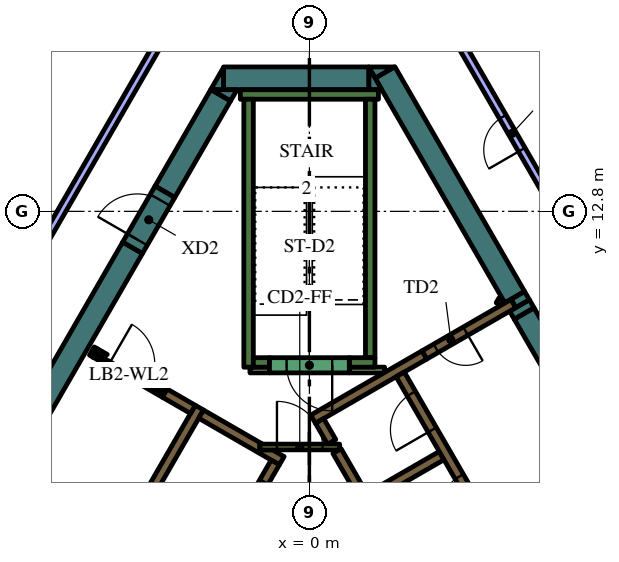
"""IFC4 building model, lengths in metres.
Left out: names, types, materials, properties, quantities, classifications, styles, units other than length and angle.
Written with IfcOpenShell. Run it as: python <this file> out.ifc"""

import sys

from ifc_helpers import new_model, si_unit, direction, frame, frame_2d, origin, place, context, subcontext, project, spatial, polyline, rectangle, outline, extrude, element, fill, save


model = new_model("IFC4")
c1 = context("Model", 3, precision=1e-05, world=origin(), true_north=direction((0.0, 1.0)))
c2 = subcontext(c1, "Body", "Model", "MODEL_VIEW")
j1 = project(units=[si_unit("LENGTHUNIT", "METRE"), si_unit("PLANEANGLEUNIT", "RADIAN")], contexts=[c1])
p1 = place(None, origin())
s1 = spatial("IfcSite", under=j1, at=p1, CompositionType="ELEMENT")
p2 = place(p1, origin())
s2 = spatial("IfcBuilding", under=s1, at=p2, CompositionType="ELEMENT")
p3 = place(p2, frame((0.0, 0.0, 300.6)))
s3 = spatial("IfcBuildingStorey", under=s2, at=p3, CompositionType="ELEMENT", Elevation=300.6)
p4 = place(p3, frame((5.529, 10.324, 0.0), z_axis=(0.0, 0.0, 1.0), x_axis=(0.499122205112, -0.866531606097, 0.0)))
e1 = element("IfcWall", 1, at=p4, inside=s3, PredefinedType="SOLIDWALL", context=c2, shape_type="SweptSolid", body=[
    extrude(rectangle(XDim=0.247, YDim=0.6, at=frame_2d((0.123, 0.0))), origin(), (0.0, 0.0, 1.0), 4.2),
])
p5 = place(p3, frame((1.989, 16.456, 0.0), z_axis=(0.0, 0.0, 1.0), x_axis=(0.499973159588, -0.866040899549, 0.0)))
e2 = element("IfcWall", 2, at=p5, inside=s3, PredefinedType="SOLIDWALL", context=c2, shape_type="SweptSolid", body=[
    extrude(rectangle(XDim=6.828, YDim=0.6, at=frame_2d((3.414, 0.0))), origin(), (0.0, 0.0, 1.0), 4.2),
])
p6 = place(p3, origin())
e3 = element("IfcWall", 3, at=p6, inside=s3, PredefinedType="SOLIDWALL", context=c2, shape_type="SweptSolid", body=[
    extrude(outline(polyline([(5.664, 10.691), (5.788, 10.476), (5.432, 10.271), (5.308, 10.486), (5.664, 10.691)])), origin(), (0.0, 0.0, 1.0), 4.2),
])
e4 = element("IfcWall", 4, at=p6, inside=s3, PredefinedType="SOLIDWALL", context=c2, shape_type="SweptSolid", body=[
    extrude(outline(polyline([(1.559, 16.6), (2.235, 16.6), (1.728, 16.307), (1.559, 16.6)])), origin(), (0.0, 0.0, 1.0), 4.2),
])
p7 = place(p3, frame((8.192, 5.711, 0.0), z_axis=(0.0, 0.0, 1.0), x_axis=(-0.500006836656, 0.866021456604, 0.0)))
e5 = element("IfcWall", 5, at=p7, inside=s3, PredefinedType="SOLIDWALL", context=c2, shape_type="SweptSolid", body=[
    extrude(rectangle(XDim=5.078, YDim=0.6, at=frame_2d((2.539, 0.0))), origin(), (0.0, 0.0, 1.0), 4.2),
])
p8 = place(p3, frame((-2.258, 16.3, 0.0), z_axis=(0.0, 0.0, 1.0), x_axis=(1.0, 0.0, 0.0)))
e6 = element("IfcWall", 6, at=p8, inside=s3, PredefinedType="SOLIDWALL", context=c2, shape_type="SweptSolid", body=[
    extrude(rectangle(XDim=3.823, YDim=0.6, at=frame_2d((1.912, 0.0))), origin(), (0.0, 0.0, 1.0), 4.2),
])
e7 = element("IfcWall", 7, at=p6, inside=s3, PredefinedType="SOLIDWALL", context=c2, shape_type="SweptSolid", body=[
    extrude(outline(polyline([(1.905, 16.0), (1.567, 16.0), (1.567, 16.585), (1.905, 16.0)])), origin(), (0.0, 0.0, 1.0), 4.2),
])
e8 = element("IfcWall", 8, at=p6, inside=s3, PredefinedType="SOLIDWALL", context=c2, shape_type="SweptSolid", body=[
    extrude(outline(polyline([(-2.598, 16.0), (-2.26, 16.585), (-2.26, 16.0), (-2.598, 16.0)])), origin(), (0.0, 0.0, 1.0), 4.2),
])
p9 = place(p3, frame((-2.335, 15.855, 0.0), z_axis=(0.0, 0.0, 1.0), x_axis=(-0.499960127962, -0.866048422692, 0.0)))
e9 = element("IfcWall", 9, at=p9, inside=s3, PredefinedType="SOLIDWALL", context=c2, shape_type="SweptSolid", body=[
    extrude(rectangle(XDim=2.934, YDim=0.6, at=frame_2d((1.467, 0.0))), origin(), (0.0, 0.0, 1.0), 4.2),
])
e10 = element("IfcWall", 10, at=p6, inside=s3, PredefinedType="SOLIDWALL", context=c2, shape_type="SweptSolid", body=[
    extrude(outline(polyline([(-1.905, 16.0), (-2.074, 15.707), (-2.581, 16.0), (-1.905, 16.0)])), origin(), (0.0, 0.0, 1.0), 4.2),
])
p10 = place(p3, frame((-12.582, -1.892, 0.0), z_axis=(0.0, 0.0, 1.0), x_axis=(0.500003640647, 0.866023301845, 0.0)))
e11 = element("IfcWall", 11, at=p10, inside=s3, PredefinedType="SOLIDWALL", context=c2, shape_type="SweptSolid", body=[
    extrude(rectangle(XDim=15.858, YDim=0.6, at=frame_2d((7.929, 0.0))), origin(), (0.0, 0.0, 1.0), 4.2),
])
p11 = place(p3, frame((-1.817, 15.875, 0.0), z_axis=(0.0, 0.0, 1.0), x_axis=(1.0, 0.0, 0.0)))
e12 = element("IfcWall", 12, at=p11, inside=s3, PredefinedType="SOLIDWALL", context=c2, shape_type="SweptSolid", body=[
    extrude(rectangle(XDim=3.634, YDim=0.25, at=frame_2d((1.817, 0.0))), origin(), (0.0, 0.0, 1.0), 4.2),
])
p12 = place(p3, frame((1.6, 8.95, 0.0), z_axis=(0.0, 0.0, 1.0), x_axis=(0.0, 1.0, 0.0)))
e13 = element("IfcWall", 13, at=p12, inside=s3, PredefinedType="SOLIDWALL", context=c2, shape_type="SweptSolid", body=[
    extrude(rectangle(XDim=6.8, YDim=0.25, at=frame_2d((3.4, 0.0))), origin(), (0.0, 0.0, 1.0), 4.2),
])
p13 = place(p3, frame((1.05, 8.825, 0.0), z_axis=(0.0, 0.0, 1.0), x_axis=(1.0, 0.0, 0.0)))
e14 = element("IfcWall", 14, at=p13, inside=s3, PredefinedType="SOLIDWALL", context=c2, shape_type="SweptSolid", body=[
    extrude(rectangle(XDim=0.675, YDim=0.25, at=frame_2d((0.337, 0.0))), origin(), (0.0, 0.0, 1.0), 4.2),
])
p14 = place(p3, frame((-1.6, 8.7, 0.0), z_axis=(0.0, 0.0, 1.0), x_axis=(0.0, 1.0, 0.0)))
e15 = element("IfcWall", 15, at=p14, inside=s3, PredefinedType="SOLIDWALL", context=c2, shape_type="SweptSolid", body=[
    extrude(rectangle(XDim=7.05, YDim=0.25, at=frame_2d((3.525, 0.0))), origin(), (0.0, 0.0, 1.0), 4.2),
])
p15 = place(p3, frame((-1.475, 8.825, 0.0), z_axis=(0.0, 0.0, 1.0), x_axis=(1.0, 0.0, 0.0)))
e16 = element("IfcWall", 16, at=p15, inside=s3, PredefinedType="SOLIDWALL", context=c2, shape_type="SweptSolid", body=[
    extrude(rectangle(XDim=0.425, YDim=0.25, at=frame_2d((0.212, 0.0))), origin(), (0.0, 0.0, 1.0), 4.2),
])
p16 = place(p3, frame((3.028, 9.023, 0.0), z_axis=(0.0, 0.0, 1.0), x_axis=(-0.866036587186, -0.49998062928, 0.0)))
e17 = element("IfcWall", 17, at=p16, inside=s3, PredefinedType="SOLIDWALL", context=c2, shape_type="SweptSolid", body=[
    extrude(rectangle(XDim=3.384, YDim=0.25, at=frame_2d((1.692, 0.0))), origin(), (0.0, 0.0, 1.0), 4.2),
])
p17 = place(p3, frame((0.268, 7.285, 0.0), z_axis=(0.0, 0.0, 1.0), x_axis=(0.500098681536, -0.865968422476, 0.0)))
e18 = element("IfcWall", 18, at=p17, inside=s3, PredefinedType="SOLIDWALL", context=c2, shape_type="SweptSolid", body=[
    extrude(rectangle(XDim=0.636, YDim=0.25, at=frame_2d((0.318, 0.0))), origin(), (0.0, 0.0, 1.0), 4.2),
])
p18 = place(p3, frame((5.97, -2.591, 0.0), z_axis=(0.0, 0.0, 1.0), x_axis=(-0.499994469932, 0.866028596547, 0.0)))
e19 = element("IfcWall", 19, at=p18, inside=s3, PredefinedType="SOLIDWALL", context=c2, shape_type="SweptSolid", body=[
    extrude(rectangle(XDim=10.488, YDim=0.25, at=frame_2d((5.244, 0.0))), origin(), (0.0, 0.0, 1.0), 4.2),
])
p19 = place(p3, frame((1.574, 5.274, 0.0), z_axis=(0.0, 0.0, 1.0), x_axis=(0.866028486751, 0.499994660107, 0.0)))
e20 = element("IfcWall", 20, at=p19, inside=s3, PredefinedType="SOLIDWALL", context=c2, shape_type="SweptSolid", body=[
    extrude(rectangle(XDim=2.2, YDim=0.25, at=frame_2d((1.1, 0.0))), origin(), (0.0, 0.0, 1.0), 4.2),
])
p20 = place(p3, frame((-8.06, -1.311, 0.0), z_axis=(0.0, 0.0, 1.0), x_axis=(0.50000273126, 0.866023826885, 0.0)))
e21 = element("IfcWall", 21, at=p20, inside=s3, PredefinedType="SOLIDWALL", context=c2, shape_type="SweptSolid", body=[
    extrude(rectangle(XDim=10.33, YDim=0.25, at=frame_2d((5.165, 0.0))), origin(), (0.0, 0.0, 1.0), 4.2),
])
e22 = element("IfcWall", 22, at=p6, inside=s3, PredefinedType="SOLIDWALL", context=c2, shape_type="SweptSolid", body=[
    extrude(outline(polyline([(-2.912, 7.356), (-2.787, 7.573), (-1.232, 6.675), (-1.303, 6.675), (-1.304, 6.675), (-1.304, 6.675), (-1.304, 6.525), (-1.304, 6.525), (-1.303, 6.525), (-0.971, 6.525), (-0.665, 6.348), (-0.79, 6.132), (-1.007, 6.257), (-1.007, 6.257), (-2.912, 7.356)])), origin(), (0.0, 0.0, 1.0), 4.2),
])
p21 = place(p3, frame((-5.725, 9.125, 0.0), z_axis=(0.0, 0.0, 1.0), x_axis=(0.866185586049, -0.49972245349, 0.0)))
e23 = element("IfcWall", 23, at=p21, inside=s3, PredefinedType="SOLIDWALL", context=c2, shape_type="SweptSolid", body=[
    extrude(rectangle(XDim=0.11, YDim=0.25, at=frame_2d((0.055, 0.0))), origin(), (0.0, 0.0, 1.0), 4.2),
])
p22 = place(p3, frame((-3.066, 7.59, 0.0), z_axis=(0.0, 0.0, 1.0), x_axis=(-0.866081358704, 0.49990307071, 0.0)))
e24 = element("IfcWall", 24, at=p22, inside=s3, PredefinedType="SOLIDWALL", context=c2, shape_type="SweptSolid", body=[
    extrude(rectangle(XDim=0.858, YDim=0.25, at=frame_2d((0.429, 0.0))), origin(), (0.0, 0.0, 1.0), 4.2),
])
e25 = element("IfcWall", 25, at=p6, inside=s3, PredefinedType="SOLIDWALL", context=c2, shape_type="SweptSolid", body=[
    extrude(outline(polyline([(-3.748, 8.128), (-3.813, 8.015), (-4.027, 8.139), (-4.017, 8.156), (-4.008, 8.173), (-4.0, 8.192), (-3.995, 8.21), (-3.991, 8.23), (-3.99, 8.25), (-3.99, 8.268), (-3.748, 8.128)])), origin(), (0.0, 0.0, 1.0), 4.2),
])
e26 = element("IfcWall", 26, at=p6, inside=s3, PredefinedType="SOLIDWALL", context=c2, shape_type="SweptSolid", body=[
    extrude(outline(polyline([(-5.689, 8.96), (-5.69, 8.961), (-5.565, 9.177), (-5.319, 9.035), (-5.335, 9.026), (-5.351, 9.015), (-5.366, 9.002), (-5.379, 8.988), (-5.392, 8.972), (-5.402, 8.956), (-5.412, 8.939), (-5.629, 9.064), (-5.629, 9.064), (-5.689, 8.96)])), origin(), (0.0, 0.0, 1.0), 4.2),
])
p23 = place(p3, frame((1.05, 8.625, 0.0), z_axis=(0.0, 0.0, 1.0), x_axis=(1.0, 0.0, 0.0)))
e27 = element("IfcWall", 27, at=p23, inside=s3, PredefinedType="PARTITIONING", context=c2, shape_type="SweptSolid", body=[
    extrude(rectangle(XDim=0.929, YDim=0.15, at=frame_2d((0.464, 0.0))), origin(), (0.0, 0.0, 1.0), 3.55),
])
p24 = place(p3, frame((-1.564, 8.625, 0.0), z_axis=(0.0, 0.0, 1.0), x_axis=(1.0, 0.0, 0.0)))
e28 = element("IfcWall", 28, at=p24, inside=s3, PredefinedType="PARTITIONING", context=c2, shape_type="SweptSolid", body=[
    extrude(rectangle(XDim=0.514, YDim=0.15, at=frame_2d((0.257, 0.0))), origin(), (0.0, 0.0, 1.0), 3.55),
])
p25 = place(p3, frame((4.98, 10.358, 0.0), z_axis=(0.0, 0.0, 1.0), x_axis=(0.500640202437, 0.86565546709, 0.0)))
e29 = element("IfcWall", 29, at=p25, inside=s3, PredefinedType="PARTITIONING", context=c2, shape_type="SweptSolid", body=[
    extrude(rectangle(XDim=0.146, YDim=0.15, at=frame_2d((0.073, 0.0))), origin(), (0.0, 0.0, 1.0), 3.55),
])
p26 = place(p3, frame((8.565, -2.185, 0.0), z_axis=(0.0, 0.0, 1.0), x_axis=(-0.499997954832, 0.866026584559, 0.0)))
e30 = element("IfcWall", 30, at=p26, inside=s3, PredefinedType="SOLIDWALL", context=c2, shape_type="SweptSolid", body=[
    extrude(rectangle(XDim=12.35, YDim=0.25, at=frame_2d((6.175, 0.0))), origin(), (0.0, 0.0, 1.0), 4.2),
])
p27 = place(p26, frame((0.685, 0.0, 0.0)))
e31 = element("IfcOpeningElement", 31, at=p27, cuts=e30, PredefinedType="OPENING", context=c2, shape_type="SweptSolid", body=[
    extrude(rectangle(XDim=0.9, YDim=2.1, at=frame_2d((0.45, 1.05))), frame((0.0, 0.135, 0.0), z_axis=(0.0, -1.0, 0.0), x_axis=(1.0, 0.0, 0.0)), (0.0, 0.0, 1.0), 0.27),
])
p28 = place(p26, frame((3.105, 0.0, 0.0)))
e32 = element("IfcOpeningElement", 32, at=p28, cuts=e30, PredefinedType="OPENING", context=c2, shape_type="SweptSolid", body=[
    extrude(rectangle(XDim=1.1, YDim=2.1, at=frame_2d((0.55, 1.05))), frame((0.0, 0.135, 0.0), z_axis=(0.0, -1.0, 0.0), x_axis=(1.0, 0.0, 0.0)), (0.0, 0.0, 1.0), 0.27),
])
p29 = place(p26, frame((5.625, 0.0, 0.0)))
e33 = element("IfcOpeningElement", 33, at=p29, cuts=e30, PredefinedType="OPENING", context=c2, shape_type="SweptSolid", body=[
    extrude(rectangle(XDim=1.1, YDim=2.1, at=frame_2d((0.55, 1.05))), frame((0.0, 0.135, 0.0), z_axis=(0.0, -1.0, 0.0), x_axis=(1.0, 0.0, 0.0)), (0.0, 0.0, 1.0), 0.27),
])
p30 = place(p26, frame((8.145, 0.0, 0.0)))
e34 = element("IfcOpeningElement", 34, at=p30, cuts=e30, PredefinedType="OPENING", context=c2, shape_type="SweptSolid", body=[
    extrude(rectangle(XDim=1.1, YDim=2.1, at=frame_2d((0.55, 1.05))), frame((0.0, 0.135, 0.0), z_axis=(0.0, -1.0, 0.0), x_axis=(1.0, 0.0, 0.0)), (0.0, 0.0, 1.0), 0.27),
])
p31 = place(p26, frame((10.665, 0.0, 0.0)))
e35 = element("IfcOpeningElement", 35, at=p31, cuts=e30, PredefinedType="OPENING", context=c2, shape_type="SweptSolid", body=[
    extrude(rectangle(XDim=1.1, YDim=2.1, at=frame_2d((0.55, 1.05))), frame((0.0, 0.135, 0.0), z_axis=(0.0, -1.0, 0.0), x_axis=(1.0, 0.0, 0.0)), (0.0, 0.0, 1.0), 0.27),
])
p32 = place(p3, frame((-0.898, 6.194, 0.0), z_axis=(0.0, 0.0, 1.0), x_axis=(-0.499996202215, -0.866027596426, 0.0)))
e36 = element("IfcWall", 36, at=p32, inside=s3, PredefinedType="SOLIDWALL", context=c2, shape_type="SweptSolid", body=[
    extrude(rectangle(XDim=9.83, YDim=0.25, at=frame_2d((4.915, 0.0))), origin(), (0.0, 0.0, 1.0), 4.2),
])
p33 = place(p32, frame((0.585, 0.0, 0.0)))
e37 = element("IfcOpeningElement", 37, at=p33, cuts=e36, PredefinedType="OPENING", context=c2, shape_type="SweptSolid", body=[
    extrude(rectangle(XDim=1.1, YDim=2.1, at=frame_2d((0.55, 1.05))), frame((0.0, 0.135, 0.0), z_axis=(0.0, -1.0, 0.0), x_axis=(1.0, 0.0, 0.0)), (0.0, 0.0, 1.0), 0.27),
])
p34 = place(p32, frame((3.105, 0.0, 0.0)))
e38 = element("IfcOpeningElement", 38, at=p34, cuts=e36, PredefinedType="OPENING", context=c2, shape_type="SweptSolid", body=[
    extrude(rectangle(XDim=1.1, YDim=2.1, at=frame_2d((0.55, 1.05))), frame((0.0, 0.135, 0.0), z_axis=(0.0, -1.0, 0.0), x_axis=(1.0, 0.0, 0.0)), (0.0, 0.0, 1.0), 0.27),
])
p35 = place(p32, frame((5.625, 0.0, 0.0)))
e39 = element("IfcOpeningElement", 39, at=p35, cuts=e36, PredefinedType="OPENING", context=c2, shape_type="SweptSolid", body=[
    extrude(rectangle(XDim=1.1, YDim=2.1, at=frame_2d((0.55, 1.05))), frame((0.0, 0.135, 0.0), z_axis=(0.0, -1.0, 0.0), x_axis=(1.0, 0.0, 0.0)), (0.0, 0.0, 1.0), 0.27),
])
p36 = place(p32, frame((8.145, 0.0, 0.0)))
e40 = element("IfcOpeningElement", 40, at=p36, cuts=e36, PredefinedType="OPENING", context=c2, shape_type="SweptSolid", body=[
    extrude(rectangle(XDim=1.1, YDim=2.1, at=frame_2d((0.55, 1.05))), frame((0.0, 0.135, 0.0), z_axis=(0.0, -1.0, 0.0), x_axis=(1.0, 0.0, 0.0)), (0.0, 0.0, 1.0), 0.27),
])
p37 = place(p3, frame((1.05, 8.75, 0.0), z_axis=(0.0, 0.0, 1.0), x_axis=(-1.0, 0.0, 0.0)))
e41 = element("IfcWall", 41, at=p37, inside=s3, PredefinedType="SOLIDWALL", context=c2, shape_type="SweptSolid", body=[
    extrude(rectangle(XDim=2.1, YDim=0.4, at=frame_2d((1.05, 0.0))), origin(), (0.0, 0.0, 1.0), 4.2),
])
p38 = place(p37, frame((0.45, 0.0, 0.0)))
e42 = element("IfcOpeningElement", 42, at=p38, cuts=e41, PredefinedType="OPENING", context=c2, shape_type="SweptSolid", body=[
    extrude(rectangle(XDim=1.2, YDim=2.1, at=frame_2d((0.6, 1.05))), frame((0.0, 0.21, 0.0), z_axis=(0.0, -1.0, 0.0), x_axis=(1.0, 0.0, 0.0)), (0.0, 0.0, 1.0), 0.42),
])
p39 = place(p3, frame((5.366, 10.373, 0.0), z_axis=(0.0, 0.0, 1.0), x_axis=(-0.866019956843, -0.50000943426, 0.0)))
e43 = element("IfcWall", 43, at=p39, inside=s3, PredefinedType="SOLIDWALL", context=c2, shape_type="SweptSolid", body=[
    extrude(rectangle(XDim=2.7, YDim=0.25, at=frame_2d((1.35, 0.0))), origin(), (0.0, 0.0, 1.0), 4.2),
])
p40 = place(p39, frame((1.45, 0.0, 0.0)))
e44 = element("IfcOpeningElement", 44, at=p40, cuts=e43, PredefinedType="OPENING", context=c2, shape_type="SweptSolid", body=[
    extrude(rectangle(XDim=0.9, YDim=2.1, at=frame_2d((0.45, 1.05))), frame((0.0, 0.135, 0.0), z_axis=(0.0, -1.0, 0.0), x_axis=(1.0, 0.0, 0.0)), (0.0, 0.0, 1.0), 0.27),
])
p41 = place(p3, frame((-1.303, 6.6, 0.0), z_axis=(0.0, 0.0, 1.0), x_axis=(1.0, 0.0, 0.0)))
e45 = element("IfcWall", 45, at=p41, inside=s3, PredefinedType="PARTITIONING", context=c2, shape_type="SweptSolid", body=[
    extrude(rectangle(XDim=2.1, YDim=0.15, at=frame_2d((1.05, 0.0))), origin(), (0.0, 0.0, 1.0), 4.2),
])
p42 = place(p41, frame((0.45, 0.0, 0.0)))
e46 = element("IfcOpeningElement", 46, at=p42, cuts=e45, PredefinedType="OPENING", context=c2, shape_type="SweptSolid", body=[
    extrude(rectangle(XDim=1.2, YDim=2.1, at=frame_2d((0.6, 1.05))), frame((0.0, 0.085, 0.0), z_axis=(0.0, -1.0, 0.0), x_axis=(1.0, 0.0, 0.0)), (0.0, 0.0, 1.0), 0.17),
])
p43 = place(p3, frame((-5.659, 9.012, 0.0), z_axis=(0.0, 0.0, 1.0), x_axis=(0.866009402589, -0.500027713859, 0.0)))
e47 = element("IfcWall", 47, at=p43, inside=s3, PredefinedType="PARTITIONING", context=c2, shape_type="SweptSolid", body=[
    extrude(rectangle(XDim=2.1, YDim=0.12, at=frame_2d((1.05, 0.0))), origin(), (0.0, 0.0, 1.0), 3.55),
])
p44 = place(p43, frame((0.45, 0.0, 0.0)))
e48 = element("IfcOpeningElement", 48, at=p44, cuts=e47, PredefinedType="OPENING", context=c2, shape_type="SweptSolid", body=[
    extrude(rectangle(XDim=1.2, YDim=2.1, at=frame_2d((0.6, 1.05))), frame((0.0, 0.07, 0.0), z_axis=(0.0, -1.0, 0.0), x_axis=(1.0, 0.0, 0.0)), (0.0, 0.0, 1.0), 0.14),
])
p45 = place(p3, frame((-4.652, 11.842, 0.0), z_axis=(0.0, 0.0, 1.0), x_axis=(0.500062241894, 0.865989465428, 0.0)))
e49 = element("IfcWall", 49, at=p45, inside=s3, PredefinedType="SOLIDWALL", context=c2, shape_type="SweptSolid", body=[
    extrude(rectangle(XDim=1.7, YDim=0.6, at=frame_2d((0.85, 0.0))), origin(), (0.0, 0.0, 1.0), 4.2),
])
p46 = place(p45, frame((0.25, 0.0, 0.0)))
e50 = element("IfcOpeningElement", 50, at=p46, cuts=e49, PredefinedType="OPENING", context=c2, shape_type="SweptSolid", body=[
    extrude(rectangle(XDim=1.2, YDim=2.1, at=frame_2d((0.6, 1.05))), frame((0.0, 0.31, 0.0), z_axis=(0.0, -1.0, 0.0), x_axis=(1.0, 0.0, 0.0)), (0.0, 0.0, 1.0), 0.62),
])
p47 = place(p3, frame((7.188, 11.65, 0.0), z_axis=(0.0, 0.0, 1.0), x_axis=(-0.499989634868, 0.866031388014, 0.0)))
e51 = element("IfcWall", 51, at=p47, inside=s3, PredefinedType="PARTITIONING", context=c2, shape_type="SweptSolid", body=[
    extrude(rectangle(XDim=7.303, YDim=0.2, at=frame_2d((3.652, 0.0))), origin(), (0.0, 0.0, 1.0), 3.55),
])
p48 = place(p47, frame((3.2, 0.0, 0.0)))
e52 = element("IfcOpeningElement", 52, at=p48, cuts=e51, PredefinedType="OPENING", context=c2, shape_type="SweptSolid", body=[
    extrude(rectangle(XDim=1.0, YDim=2.1, at=frame_2d((0.5, 1.05))), frame((0.0, 0.11, 0.0), z_axis=(0.0, -1.0, 0.0), x_axis=(1.0, 0.0, 0.0)), (0.0, 0.0, 1.0), 0.22),
])
p49 = place(p3, frame((-7.962, 15.8, 0.0), z_axis=(0.0, 0.0, 1.0), x_axis=(0.599541489613, 0.800343677574, 0.0)))
e53 = element("IfcWall", 53, at=p49, inside=s3, PredefinedType="PARTITIONING", context=c2, shape_type="SweptSolid", body=[
    extrude(rectangle(XDim=4.942, YDim=0.15, at=frame_2d((2.471, 0.0))), origin(), (0.0, 0.0, 1.0), 3.55),
])
p50 = place(p49, frame((2.042, 0.0, 0.0)))
e54 = element("IfcOpeningElement", 54, at=p50, cuts=e53, PredefinedType="OPENING", context=c2, shape_type="SweptSolid", body=[
    extrude(rectangle(XDim=0.9, YDim=2.1, at=frame_2d((0.45, 1.05))), frame((0.0, 0.085, 0.0), z_axis=(0.0, -1.0, 0.0), x_axis=(1.0, 0.0, 0.0)), (0.0, 0.0, 1.0), 0.17),
])
p51 = place(p3, frame((-3.306, 18.374, 0.0), z_axis=(0.0, 0.0, 1.0), x_axis=(-0.499999798456, -0.866025520146, 0.0)))
e55 = element("IfcWall", 55, at=p51, inside=s3, PredefinedType="PARTITIONING", context=c2, shape_type="SweptSolid", body=[
    extrude(rectangle(XDim=8.229, YDim=0.2, at=frame_2d((4.115, 0.0))), origin(), (0.0, 0.0, 1.0), 3.55),
])
p52 = place(p30, origin())
e56 = element("IfcDoor", 56, at=p52, inside=s3, OperationType="DOUBLE_DOOR_SLIDING", PredefinedType="DOOR", context=c2, shape_type="SweptSolid", body=[
    extrude(rectangle(XDim=1.1, YDim=2.1, at=frame_2d((0.55, 1.05))), frame((0.0, 0.025, 0.0), z_axis=(0.0, -1.0, 0.0), x_axis=(1.0, 0.0, 0.0)), (0.0, 0.0, 1.0), 0.05),
])
fill(e34, e56)
p53 = place(p31, origin())
e57 = element("IfcDoor", 57, at=p53, inside=s3, OperationType="DOUBLE_DOOR_SLIDING", PredefinedType="DOOR", context=c2, shape_type="SweptSolid", body=[
    extrude(rectangle(XDim=1.1, YDim=2.1, at=frame_2d((0.55, 1.05))), frame((0.0, 0.025, 0.0), z_axis=(0.0, -1.0, 0.0), x_axis=(1.0, 0.0, 0.0)), (0.0, 0.0, 1.0), 0.05),
])
fill(e35, e57)
p54 = place(p33, origin())
e58 = element("IfcDoor", 58, at=p54, inside=s3, OperationType="DOUBLE_DOOR_SLIDING", PredefinedType="DOOR", context=c2, shape_type="SweptSolid", body=[
    extrude(rectangle(XDim=1.1, YDim=2.1, at=frame_2d((0.55, 1.05))), frame((0.0, 0.025, 0.0), z_axis=(0.0, -1.0, 0.0), x_axis=(1.0, 0.0, 0.0)), (0.0, 0.0, 1.0), 0.05),
])
fill(e37, e58)
p55 = place(p38, origin())
e59 = element("IfcDoor", 59, at=p55, inside=s3, OperationType="SINGLE_SWING_LEFT", PredefinedType="DOOR", context=c2, shape_type="SweptSolid", body=[
    extrude(rectangle(XDim=1.2, YDim=2.1, at=frame_2d((0.6, 1.05))), frame((0.0, 0.025, 0.0), z_axis=(0.0, -1.0, 0.0), x_axis=(1.0, 0.0, 0.0)), (0.0, 0.0, 1.0), 0.05),
])
fill(e42, e59)
p56 = place(p40, origin())
e60 = element("IfcDoor", 60, at=p56, inside=s3, OperationType="SINGLE_SWING_LEFT", PredefinedType="DOOR", context=c2, shape_type="SweptSolid", body=[
    extrude(rectangle(XDim=0.9, YDim=2.1, at=frame_2d((0.45, 1.05))), frame((0.0, 0.025, 0.0), z_axis=(0.0, -1.0, 0.0), x_axis=(1.0, 0.0, 0.0)), (0.0, 0.0, 1.0), 0.05),
])
fill(e44, e60)
p57 = place(p42, origin())
e61 = element("IfcDoor", 61, at=p57, inside=s3, OperationType="SINGLE_SWING_LEFT", PredefinedType="DOOR", context=c2, shape_type="SweptSolid", body=[
    extrude(rectangle(XDim=1.2, YDim=2.1, at=frame_2d((0.6, 1.05))), frame((0.0, 0.025, 0.0), z_axis=(0.0, -1.0, 0.0), x_axis=(1.0, 0.0, 0.0)), (0.0, 0.0, 1.0), 0.05),
])
fill(e46, e61)
p58 = place(p44, origin())
e62 = element("IfcDoor", 62, at=p58, inside=s3, OperationType="SINGLE_SWING_LEFT", PredefinedType="DOOR", context=c2, shape_type="SweptSolid", body=[
    extrude(rectangle(XDim=1.2, YDim=2.1, at=frame_2d((0.6, 1.05))), frame((0.0, 0.025, 0.0), z_axis=(0.0, -1.0, 0.0), x_axis=(1.0, 0.0, 0.0)), (0.0, 0.0, 1.0), 0.05),
])
fill(e48, e62)
p59 = place(p46, origin())
e63 = element("IfcDoor", 63, at=p59, inside=s3, OperationType="SINGLE_SWING_LEFT", PredefinedType="DOOR", context=c2, shape_type="SweptSolid", body=[
    extrude(rectangle(XDim=1.2, YDim=2.1, at=frame_2d((0.6, 1.05))), frame((0.0, 0.025, 0.0), z_axis=(0.0, -1.0, 0.0), x_axis=(1.0, 0.0, 0.0)), (0.0, 0.0, 1.0), 0.05),
])
fill(e50, e63)
p60 = place(p48, origin())
e64 = element("IfcDoor", 64, at=p60, inside=s3, OperationType="SINGLE_SWING_RIGHT", PredefinedType="DOOR", context=c2, shape_type="SweptSolid", body=[
    extrude(rectangle(XDim=1.0, YDim=2.1, at=frame_2d((0.5, 1.05))), frame((0.0, 0.025, 0.0), z_axis=(0.0, -1.0, 0.0), x_axis=(1.0, 0.0, 0.0)), (0.0, 0.0, 1.0), 0.05),
])
fill(e52, e64)
save(model, sys.argv[1])
